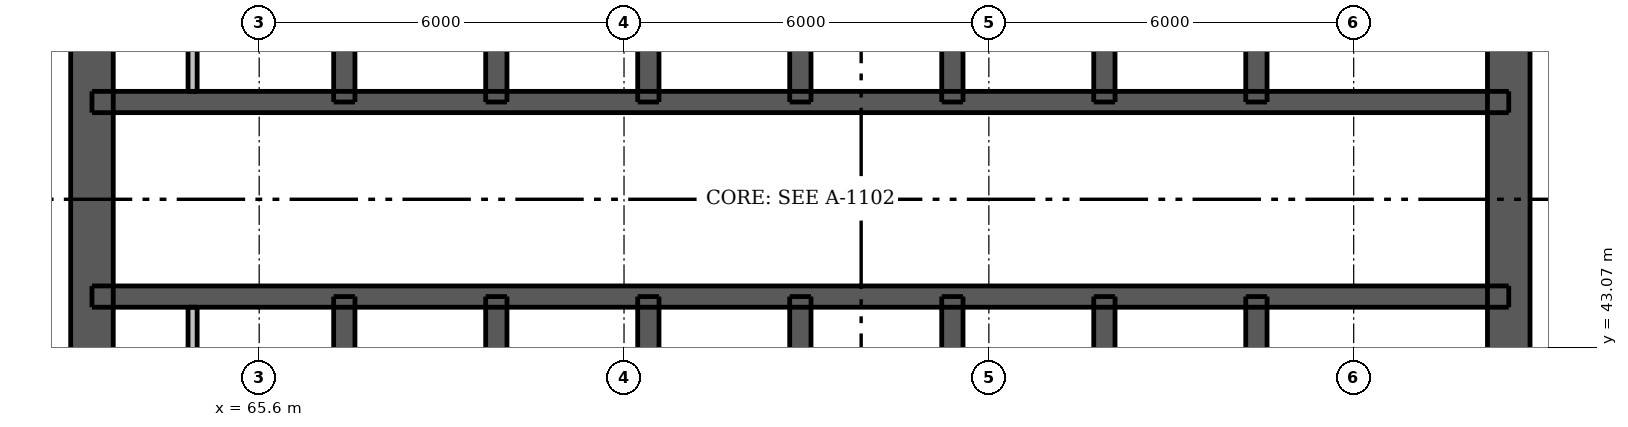
"""IFC4 building model, lengths in metres.
Left out: names, types, materials, properties, quantities, classifications, styles, units other than length and angle.
Written with IfcOpenShell. Run it as: python <this file> out.ifc"""

import sys

from ifc_helpers import new_model, si_unit, direction, frame, frame_2d, origin, place, context, subcontext, project, spatial, rectangle, extrude, element, fill, save


model = new_model("IFC4")
c1 = context("Model", 3, precision=1e-05, world=origin(), true_north=direction((0.0, 1.0)))
c2 = subcontext(c1, "Body", "Model", "MODEL_VIEW")
j1 = project(units=[si_unit("LENGTHUNIT", "METRE"), si_unit("PLANEANGLEUNIT", "RADIAN")], contexts=[c1])
p1 = place(None, origin())
s1 = spatial("IfcSite", under=j1, at=p1, CompositionType="ELEMENT")
p2 = place(p1, origin())
s2 = spatial("IfcBuilding", under=s1, at=p2, CompositionType="ELEMENT")
p3 = place(p2, frame((0.0, 0.0, 150.4)))
s3 = spatial("IfcBuildingStorey", under=s2, at=p3, CompositionType="ELEMENT", Elevation=150.4)
p4 = place(p3, frame((62.85, 33.5, 0.0), z_axis=(0.0, 0.0, 1.0), x_axis=(0.0, 1.0, 0.0)))
e1 = element("IfcWall", 1, at=p4, inside=s3, PredefinedType="SHEAR", context=c2, shape_type="SweptSolid", body=[
    extrude(rectangle(XDim=24.0, YDim=0.7, at=frame_2d((12.0, 0.0))), origin(), (0.0, 0.0, 1.0), 4.25),
])
p5 = place(p4, frame((11.2, 0.0, 0.0)))
e2 = element("IfcOpeningElement", 2, at=p5, cuts=e1, PredefinedType="OPENING", context=c2, shape_type="SweptSolid", body=[
    extrude(rectangle(XDim=1.6, YDim=2.1, at=frame_2d((0.8, 1.05))), frame((0.0, 0.36, 0.0), z_axis=(0.0, -1.0, 0.0), x_axis=(1.0, 0.0, 0.0)), (0.0, 0.0, 1.0), 0.72),
])
p6 = place(p3, frame((86.15, 33.5, 0.0), z_axis=(0.0, 0.0, 1.0), x_axis=(0.0, 1.0, 0.0)))
e3 = element("IfcWall", 3, at=p6, inside=s3, PredefinedType="SHEAR", context=c2, shape_type="SweptSolid", body=[
    extrude(rectangle(XDim=24.0, YDim=0.7, at=frame_2d((12.0, 0.0))), origin(), (0.0, 0.0, 1.0), 4.25),
])
p7 = place(p6, frame((11.2, 0.0, 0.0)))
e4 = element("IfcOpeningElement", 4, at=p7, cuts=e3, PredefinedType="OPENING", context=c2, shape_type="SweptSolid", body=[
    extrude(rectangle(XDim=1.6, YDim=2.1, at=frame_2d((0.8, 1.05))), frame((0.0, 0.36, 0.0), z_axis=(0.0, -1.0, 0.0), x_axis=(1.0, 0.0, 0.0)), (0.0, 0.0, 1.0), 0.72),
])
p8 = place(p3, frame((62.85, 43.9, 0.0), z_axis=(0.0, 0.0, 1.0), x_axis=(1.0, 0.0, 0.0)))
e5 = element("IfcWall", 5, at=p8, inside=s3, PredefinedType="SHEAR", context=c2, shape_type="SweptSolid", body=[
    extrude(rectangle(XDim=23.3, YDim=0.35, at=frame_2d((11.65, 0.0))), origin(), (0.0, 0.0, 1.0), 4.25),
])
p9 = place(p8, frame((0.603, 0.0, 0.0)))
e6 = element("IfcOpeningElement", 6, at=p9, cuts=e5, PredefinedType="OPENING", context=c2, shape_type="SweptSolid", body=[
    extrude(rectangle(XDim=0.8, YDim=2.1, at=frame_2d((0.4, 1.05))), frame((0.0, 0.185, 0.0), z_axis=(0.0, -1.0, 0.0), x_axis=(1.0, 0.0, 0.0)), (0.0, 0.0, 1.0), 0.37),
])
p10 = place(p8, frame((2.365, 0.0, 0.0)))
e7 = element("IfcOpeningElement", 7, at=p10, cuts=e5, PredefinedType="OPENING", context=c2, shape_type="SweptSolid", body=[
    extrude(rectangle(XDim=0.9, YDim=2.1, at=frame_2d((0.45, 1.05))), frame((0.0, 0.185, 0.0), z_axis=(0.0, -1.0, 0.0), x_axis=(1.0, 0.0, 0.0)), (0.0, 0.0, 1.0), 0.37),
])
p11 = place(p8, frame((20.688, 0.0, 0.0)))
e8 = element("IfcOpeningElement", 8, at=p11, cuts=e5, PredefinedType="OPENING", context=c2, shape_type="SweptSolid", body=[
    extrude(rectangle(XDim=0.9, YDim=2.1, at=frame_2d((0.45, 1.05))), frame((0.0, 0.185, 0.0), z_axis=(0.0, -1.0, 0.0), x_axis=(1.0, 0.0, 0.0)), (0.0, 0.0, 1.0), 0.37),
])
p12 = place(p8, frame((4.85, 0.0, 0.0)))
e9 = element("IfcOpeningElement", 9, at=p12, cuts=e5, PredefinedType="OPENING", context=c2, shape_type="SweptSolid", body=[
    extrude(rectangle(XDim=1.1, YDim=2.1, at=frame_2d((0.55, 1.05))), frame((0.0, 0.185, 0.0), z_axis=(0.0, -1.0, 0.0), x_axis=(1.0, 0.0, 0.0)), (0.0, 0.0, 1.0), 0.37),
])
p13 = place(p8, frame((7.35, 0.0, 0.0)))
e10 = element("IfcOpeningElement", 10, at=p13, cuts=e5, PredefinedType="OPENING", context=c2, shape_type="SweptSolid", body=[
    extrude(rectangle(XDim=1.1, YDim=2.1, at=frame_2d((0.55, 1.05))), frame((0.0, 0.185, 0.0), z_axis=(0.0, -1.0, 0.0), x_axis=(1.0, 0.0, 0.0)), (0.0, 0.0, 1.0), 0.37),
])
p14 = place(p8, frame((9.85, 0.0, 0.0)))
e11 = element("IfcOpeningElement", 11, at=p14, cuts=e5, PredefinedType="OPENING", context=c2, shape_type="SweptSolid", body=[
    extrude(rectangle(XDim=1.1, YDim=2.1, at=frame_2d((0.55, 1.05))), frame((0.0, 0.185, 0.0), z_axis=(0.0, -1.0, 0.0), x_axis=(1.0, 0.0, 0.0)), (0.0, 0.0, 1.0), 0.37),
])
p15 = place(p8, frame((12.35, 0.0, 0.0)))
e12 = element("IfcOpeningElement", 12, at=p15, cuts=e5, PredefinedType="OPENING", context=c2, shape_type="SweptSolid", body=[
    extrude(rectangle(XDim=1.1, YDim=2.1, at=frame_2d((0.55, 1.05))), frame((0.0, 0.185, 0.0), z_axis=(0.0, -1.0, 0.0), x_axis=(1.0, 0.0, 0.0)), (0.0, 0.0, 1.0), 0.37),
])
p16 = place(p8, frame((14.85, 0.0, 0.0)))
e13 = element("IfcOpeningElement", 13, at=p16, cuts=e5, PredefinedType="OPENING", context=c2, shape_type="SweptSolid", body=[
    extrude(rectangle(XDim=1.1, YDim=2.1, at=frame_2d((0.55, 1.05))), frame((0.0, 0.185, 0.0), z_axis=(0.0, -1.0, 0.0), x_axis=(1.0, 0.0, 0.0)), (0.0, 0.0, 1.0), 0.37),
])
p17 = place(p8, frame((17.35, 0.0, 0.0)))
e14 = element("IfcOpeningElement", 14, at=p17, cuts=e5, PredefinedType="OPENING", context=c2, shape_type="SweptSolid", body=[
    extrude(rectangle(XDim=1.1, YDim=2.1, at=frame_2d((0.55, 1.05))), frame((0.0, 0.185, 0.0), z_axis=(0.0, -1.0, 0.0), x_axis=(1.0, 0.0, 0.0)), (0.0, 0.0, 1.0), 0.37),
])
p18 = place(p3, frame((62.85, 47.1, 0.0), z_axis=(0.0, 0.0, 1.0), x_axis=(1.0, 0.0, 0.0)))
e15 = element("IfcWall", 15, at=p18, inside=s3, PredefinedType="SHEAR", context=c2, shape_type="SweptSolid", body=[
    extrude(rectangle(XDim=23.3, YDim=0.35, at=frame_2d((11.65, 0.0))), origin(), (0.0, 0.0, 1.0), 4.25),
])
p19 = place(p18, frame((0.603, 0.0, 0.0)))
e16 = element("IfcOpeningElement", 16, at=p19, cuts=e15, PredefinedType="OPENING", context=c2, shape_type="SweptSolid", body=[
    extrude(rectangle(XDim=0.8, YDim=2.1, at=frame_2d((0.4, 1.05))), frame((0.0, 0.185, 0.0), z_axis=(0.0, -1.0, 0.0), x_axis=(1.0, 0.0, 0.0)), (0.0, 0.0, 1.0), 0.37),
])
p20 = place(p18, frame((2.365, 0.0, 0.0)))
e17 = element("IfcOpeningElement", 17, at=p20, cuts=e15, PredefinedType="OPENING", context=c2, shape_type="SweptSolid", body=[
    extrude(rectangle(XDim=0.9, YDim=2.1, at=frame_2d((0.45, 1.05))), frame((0.0, 0.185, 0.0), z_axis=(0.0, -1.0, 0.0), x_axis=(1.0, 0.0, 0.0)), (0.0, 0.0, 1.0), 0.37),
])
p21 = place(p18, frame((20.688, 0.0, 0.0)))
e18 = element("IfcOpeningElement", 18, at=p21, cuts=e15, PredefinedType="OPENING", context=c2, shape_type="SweptSolid", body=[
    extrude(rectangle(XDim=0.9, YDim=2.1, at=frame_2d((0.45, 1.05))), frame((0.0, 0.185, 0.0), z_axis=(0.0, -1.0, 0.0), x_axis=(1.0, 0.0, 0.0)), (0.0, 0.0, 1.0), 0.37),
])
p22 = place(p18, frame((4.85, 0.0, 0.0)))
e19 = element("IfcOpeningElement", 19, at=p22, cuts=e15, PredefinedType="OPENING", context=c2, shape_type="SweptSolid", body=[
    extrude(rectangle(XDim=1.1, YDim=2.1, at=frame_2d((0.55, 1.05))), frame((0.0, 0.185, 0.0), z_axis=(0.0, -1.0, 0.0), x_axis=(1.0, 0.0, 0.0)), (0.0, 0.0, 1.0), 0.37),
])
p23 = place(p18, frame((7.35, 0.0, 0.0)))
e20 = element("IfcOpeningElement", 20, at=p23, cuts=e15, PredefinedType="OPENING", context=c2, shape_type="SweptSolid", body=[
    extrude(rectangle(XDim=1.1, YDim=2.1, at=frame_2d((0.55, 1.05))), frame((0.0, 0.185, 0.0), z_axis=(0.0, -1.0, 0.0), x_axis=(1.0, 0.0, 0.0)), (0.0, 0.0, 1.0), 0.37),
])
p24 = place(p18, frame((9.85, 0.0, 0.0)))
e21 = element("IfcOpeningElement", 21, at=p24, cuts=e15, PredefinedType="OPENING", context=c2, shape_type="SweptSolid", body=[
    extrude(rectangle(XDim=1.1, YDim=2.1, at=frame_2d((0.55, 1.05))), frame((0.0, 0.185, 0.0), z_axis=(0.0, -1.0, 0.0), x_axis=(1.0, 0.0, 0.0)), (0.0, 0.0, 1.0), 0.37),
])
p25 = place(p18, frame((12.35, 0.0, 0.0)))
e22 = element("IfcOpeningElement", 22, at=p25, cuts=e15, PredefinedType="OPENING", context=c2, shape_type="SweptSolid", body=[
    extrude(rectangle(XDim=1.1, YDim=2.1, at=frame_2d((0.55, 1.05))), frame((0.0, 0.185, 0.0), z_axis=(0.0, -1.0, 0.0), x_axis=(1.0, 0.0, 0.0)), (0.0, 0.0, 1.0), 0.37),
])
p26 = place(p18, frame((14.85, 0.0, 0.0)))
e23 = element("IfcOpeningElement", 23, at=p26, cuts=e15, PredefinedType="OPENING", context=c2, shape_type="SweptSolid", body=[
    extrude(rectangle(XDim=1.1, YDim=2.1, at=frame_2d((0.55, 1.05))), frame((0.0, 0.185, 0.0), z_axis=(0.0, -1.0, 0.0), x_axis=(1.0, 0.0, 0.0)), (0.0, 0.0, 1.0), 0.37),
])
p27 = place(p18, frame((17.35, 0.0, 0.0)))
e24 = element("IfcOpeningElement", 24, at=p27, cuts=e15, PredefinedType="OPENING", context=c2, shape_type="SweptSolid", body=[
    extrude(rectangle(XDim=1.1, YDim=2.1, at=frame_2d((0.55, 1.05))), frame((0.0, 0.185, 0.0), z_axis=(0.0, -1.0, 0.0), x_axis=(1.0, 0.0, 0.0)), (0.0, 0.0, 1.0), 0.37),
])
p28 = place(p3, frame((67.0, 33.85, 0.0), z_axis=(0.0, 0.0, 1.0), x_axis=(0.0, 1.0, 0.0)))
e25 = element("IfcWall", 25, at=p28, inside=s3, PredefinedType="SHEAR", context=c2, shape_type="SweptSolid", body=[
    extrude(rectangle(XDim=10.05, YDim=0.35, at=frame_2d((5.025, 0.0))), origin(), (0.0, 0.0, 1.0), 4.25),
])
p29 = place(p28, frame((0.55, 0.0, 0.0)))
e26 = element("IfcOpeningElement", 26, at=p29, cuts=e25, PredefinedType="OPENING", context=c2, shape_type="SweptSolid", body=[
    extrude(rectangle(XDim=1.1, YDim=2.1, at=frame_2d((0.55, 1.05))), frame((0.0, 0.185, 0.0), z_axis=(0.0, -1.0, 0.0), x_axis=(1.0, 0.0, 0.0)), (0.0, 0.0, 1.0), 0.37),
])
for number, where, z_axis, x_axis in (
    (27, (67.0, 47.1, 0.0), (0.0, 0.0, 1.0), (0.0, 1.0, 0.0)),
    (28, (82.0, 33.85, 0.0), (0.0, 0.0, 1.0), (0.0, 1.0, 0.0)),
    (29, (82.0, 47.1, 0.0), (0.0, 0.0, 1.0), (0.0, 1.0, 0.0)),
):
    element("IfcWall", number, at=place(p3, frame(where, z_axis=z_axis, x_axis=x_axis)), inside=s3, PredefinedType="SHEAR", context=c2, shape_type="SweptSolid", body=[
        extrude(rectangle(XDim=10.05, YDim=0.35, at=frame_2d((5.025, 0.0))), origin(), (0.0, 0.0, 1.0), 4.25),
    ])
for number, where, z_axis, x_axis in (
    (30, (69.5, 41.0, 0.0), (0.0, 0.0, 1.0), (0.0, 1.0, 0.0)),
    (31, (69.5, 47.1, 0.0), (0.0, 0.0, 1.0), (0.0, 1.0, 0.0)),
    (32, (72.0, 41.0, 0.0), (0.0, 0.0, 1.0), (0.0, 1.0, 0.0)),
    (33, (72.0, 47.1, 0.0), (0.0, 0.0, 1.0), (0.0, 1.0, 0.0)),
    (34, (74.5, 41.0, 0.0), (0.0, 0.0, 1.0), (0.0, 1.0, 0.0)),
    (35, (74.5, 47.1, 0.0), (0.0, 0.0, 1.0), (0.0, 1.0, 0.0)),
    (36, (77.0, 41.0, 0.0), (0.0, 0.0, 1.0), (0.0, 1.0, 0.0)),
    (37, (77.0, 47.1, 0.0), (0.0, 0.0, 1.0), (0.0, 1.0, 0.0)),
    (38, (79.5, 41.0, 0.0), (0.0, 0.0, 1.0), (0.0, 1.0, 0.0)),
    (39, (79.5, 47.1, 0.0), (0.0, 0.0, 1.0), (0.0, 1.0, 0.0)),
):
    element("IfcWall", number, at=place(p3, frame(where, z_axis=z_axis, x_axis=x_axis)), inside=s3, PredefinedType="SHEAR", context=c2, shape_type="SweptSolid", body=[
        extrude(rectangle(XDim=2.9, YDim=0.35, at=frame_2d((1.45, 0.0))), origin(), (0.0, 0.0, 1.0), 4.25),
    ])
for number, where, z_axis, x_axis in (
    (40, (64.505, 41.175, 0.0), (0.0, 0.0, 1.0), (0.0, 1.0, 0.0)),
    (41, (64.505, 47.275, 0.0), (0.0, 0.0, 1.0), (0.0, 1.0, 0.0)),
):
    element("IfcWall", number, at=place(p3, frame(where, z_axis=z_axis, x_axis=x_axis)), inside=s3, PredefinedType="PLUMBINGWALL", context=c2, shape_type="SweptSolid", body=[
        extrude(rectangle(XDim=2.55, YDim=0.15, at=frame_2d((1.275, 0.0))), origin(), (0.0, 0.0, 1.0), 4.25),
    ])
p30 = place(p5, origin())
e42 = element("IfcDoor", 42, at=p30, inside=s3, OperationType="DOUBLE_DOOR_SINGLE_SWING", PredefinedType="DOOR", context=c2, shape_type="SweptSolid", body=[
    extrude(rectangle(XDim=1.6, YDim=2.1, at=frame_2d((0.8, 1.05))), frame((0.0, -0.288, 0.0), z_axis=(0.0, -1.0, 0.0), x_axis=(1.0, 0.0, 0.0)), (0.0, 0.0, 1.0), 0.05),
])
fill(e2, e42)
p31 = place(p7, origin())
e43 = element("IfcDoor", 43, at=p31, inside=s3, OperationType="DOUBLE_DOOR_SINGLE_SWING", PredefinedType="DOOR", context=c2, shape_type="SweptSolid", body=[
    extrude(rectangle(XDim=1.6, YDim=2.1, at=frame_2d((0.8, 1.05))), frame((0.0, 0.337, 0.0), z_axis=(0.0, -1.0, 0.0), x_axis=(1.0, 0.0, 0.0)), (0.0, 0.0, 1.0), 0.05),
])
fill(e4, e43)
p32 = place(p9, origin())
e44 = element("IfcDoor", 44, at=p32, inside=s3, OperationType="SINGLE_SWING_LEFT", PredefinedType="DOOR", context=c2, shape_type="SweptSolid", body=[
    extrude(rectangle(XDim=0.8, YDim=2.1, at=frame_2d((0.4, 1.05))), frame((0.0, -0.112, 0.0), z_axis=(0.0, -1.0, 0.0), x_axis=(1.0, 0.0, 0.0)), (0.0, 0.0, 1.0), 0.05),
])
fill(e6, e44)
p33 = place(p10, origin())
e45 = element("IfcDoor", 45, at=p33, inside=s3, OperationType="SINGLE_SWING_RIGHT", PredefinedType="DOOR", context=c2, shape_type="SweptSolid", body=[
    extrude(rectangle(XDim=0.9, YDim=2.1, at=frame_2d((0.45, 1.05))), frame((0.0, -0.112, 0.0), z_axis=(0.0, -1.0, 0.0), x_axis=(1.0, 0.0, 0.0)), (0.0, 0.0, 1.0), 0.05),
])
fill(e7, e45)
p34 = place(p11, origin())
e46 = element("IfcDoor", 46, at=p34, inside=s3, OperationType="SINGLE_SWING_LEFT", PredefinedType="DOOR", context=c2, shape_type="SweptSolid", body=[
    extrude(rectangle(XDim=0.9, YDim=2.1, at=frame_2d((0.45, 1.05))), frame((0.0, -0.112, 0.0), z_axis=(0.0, -1.0, 0.0), x_axis=(1.0, 0.0, 0.0)), (0.0, 0.0, 1.0), 0.05),
])
fill(e8, e46)
p35 = place(p19, origin())
e47 = element("IfcDoor", 47, at=p35, inside=s3, OperationType="SINGLE_SWING_LEFT", PredefinedType="DOOR", context=c2, shape_type="SweptSolid", body=[
    extrude(rectangle(XDim=0.8, YDim=2.1, at=frame_2d((0.4, 1.05))), frame((0.0, 0.163, 0.0), z_axis=(0.0, -1.0, 0.0), x_axis=(1.0, 0.0, 0.0)), (0.0, 0.0, 1.0), 0.05),
])
fill(e16, e47)
p36 = place(p20, origin())
e48 = element("IfcDoor", 48, at=p36, inside=s3, OperationType="SINGLE_SWING_RIGHT", PredefinedType="DOOR", context=c2, shape_type="SweptSolid", body=[
    extrude(rectangle(XDim=0.9, YDim=2.1, at=frame_2d((0.45, 1.05))), frame((0.0, 0.163, 0.0), z_axis=(0.0, -1.0, 0.0), x_axis=(1.0, 0.0, 0.0)), (0.0, 0.0, 1.0), 0.05),
])
fill(e17, e48)
p37 = place(p21, origin())
e49 = element("IfcDoor", 49, at=p37, inside=s3, OperationType="SINGLE_SWING_LEFT", PredefinedType="DOOR", context=c2, shape_type="SweptSolid", body=[
    extrude(rectangle(XDim=0.9, YDim=2.1, at=frame_2d((0.45, 1.05))), frame((0.0, 0.163, 0.0), z_axis=(0.0, -1.0, 0.0), x_axis=(1.0, 0.0, 0.0)), (0.0, 0.0, 1.0), 0.05),
])
fill(e18, e49)
p38 = place(p12, origin())
e50 = element("IfcDoor", 50, at=p38, inside=s3, OperationType="DOUBLE_DOOR_SLIDING", PredefinedType="DOOR", context=c2, shape_type="SweptSolid", body=[
    extrude(rectangle(XDim=1.1, YDim=2.1, at=frame_2d((0.55, 1.05))), frame((0.0, 0.025, 0.0), z_axis=(0.0, -1.0, 0.0), x_axis=(1.0, 0.0, 0.0)), (0.0, 0.0, 1.0), 0.05),
])
fill(e9, e50)
p39 = place(p22, origin())
e51 = element("IfcDoor", 51, at=p39, inside=s3, OperationType="DOUBLE_DOOR_SLIDING", PredefinedType="DOOR", context=c2, shape_type="SweptSolid", body=[
    extrude(rectangle(XDim=1.1, YDim=2.1, at=frame_2d((0.55, 1.05))), frame((0.0, 0.025, 0.0), z_axis=(0.0, -1.0, 0.0), x_axis=(1.0, 0.0, 0.0)), (0.0, 0.0, 1.0), 0.05),
])
fill(e19, e51)
p40 = place(p13, origin())
e52 = element("IfcDoor", 52, at=p40, inside=s3, OperationType="DOUBLE_DOOR_SLIDING", PredefinedType="DOOR", context=c2, shape_type="SweptSolid", body=[
    extrude(rectangle(XDim=1.1, YDim=2.1, at=frame_2d((0.55, 1.05))), frame((0.0, 0.025, 0.0), z_axis=(0.0, -1.0, 0.0), x_axis=(1.0, 0.0, 0.0)), (0.0, 0.0, 1.0), 0.05),
])
fill(e10, e52)
p41 = place(p23, origin())
e53 = element("IfcDoor", 53, at=p41, inside=s3, OperationType="DOUBLE_DOOR_SLIDING", PredefinedType="DOOR", context=c2, shape_type="SweptSolid", body=[
    extrude(rectangle(XDim=1.1, YDim=2.1, at=frame_2d((0.55, 1.05))), frame((0.0, 0.025, 0.0), z_axis=(0.0, -1.0, 0.0), x_axis=(1.0, 0.0, 0.0)), (0.0, 0.0, 1.0), 0.05),
])
fill(e20, e53)
p42 = place(p14, origin())
e54 = element("IfcDoor", 54, at=p42, inside=s3, OperationType="DOUBLE_DOOR_SLIDING", PredefinedType="DOOR", context=c2, shape_type="SweptSolid", body=[
    extrude(rectangle(XDim=1.1, YDim=2.1, at=frame_2d((0.55, 1.05))), frame((0.0, 0.025, 0.0), z_axis=(0.0, -1.0, 0.0), x_axis=(1.0, 0.0, 0.0)), (0.0, 0.0, 1.0), 0.05),
])
fill(e11, e54)
p43 = place(p24, origin())
e55 = element("IfcDoor", 55, at=p43, inside=s3, OperationType="DOUBLE_DOOR_SLIDING", PredefinedType="DOOR", context=c2, shape_type="SweptSolid", body=[
    extrude(rectangle(XDim=1.1, YDim=2.1, at=frame_2d((0.55, 1.05))), frame((0.0, 0.025, 0.0), z_axis=(0.0, -1.0, 0.0), x_axis=(1.0, 0.0, 0.0)), (0.0, 0.0, 1.0), 0.05),
])
fill(e21, e55)
p44 = place(p15, origin())
e56 = element("IfcDoor", 56, at=p44, inside=s3, OperationType="DOUBLE_DOOR_SLIDING", PredefinedType="DOOR", context=c2, shape_type="SweptSolid", body=[
    extrude(rectangle(XDim=1.1, YDim=2.1, at=frame_2d((0.55, 1.05))), frame((0.0, 0.025, 0.0), z_axis=(0.0, -1.0, 0.0), x_axis=(1.0, 0.0, 0.0)), (0.0, 0.0, 1.0), 0.05),
])
fill(e12, e56)
p45 = place(p25, origin())
e57 = element("IfcDoor", 57, at=p45, inside=s3, OperationType="DOUBLE_DOOR_SLIDING", PredefinedType="DOOR", context=c2, shape_type="SweptSolid", body=[
    extrude(rectangle(XDim=1.1, YDim=2.1, at=frame_2d((0.55, 1.05))), frame((0.0, 0.025, 0.0), z_axis=(0.0, -1.0, 0.0), x_axis=(1.0, 0.0, 0.0)), (0.0, 0.0, 1.0), 0.05),
])
fill(e22, e57)
p46 = place(p16, origin())
e58 = element("IfcDoor", 58, at=p46, inside=s3, OperationType="DOUBLE_DOOR_SLIDING", PredefinedType="DOOR", context=c2, shape_type="SweptSolid", body=[
    extrude(rectangle(XDim=1.1, YDim=2.1, at=frame_2d((0.55, 1.05))), frame((0.0, 0.025, 0.0), z_axis=(0.0, -1.0, 0.0), x_axis=(1.0, 0.0, 0.0)), (0.0, 0.0, 1.0), 0.05),
])
fill(e13, e58)
p47 = place(p26, origin())
e59 = element("IfcDoor", 59, at=p47, inside=s3, OperationType="DOUBLE_DOOR_SLIDING", PredefinedType="DOOR", context=c2, shape_type="SweptSolid", body=[
    extrude(rectangle(XDim=1.1, YDim=2.1, at=frame_2d((0.55, 1.05))), frame((0.0, 0.025, 0.0), z_axis=(0.0, -1.0, 0.0), x_axis=(1.0, 0.0, 0.0)), (0.0, 0.0, 1.0), 0.05),
])
fill(e23, e59)
p48 = place(p17, origin())
e60 = element("IfcDoor", 60, at=p48, inside=s3, OperationType="DOUBLE_DOOR_SLIDING", PredefinedType="DOOR", context=c2, shape_type="SweptSolid", body=[
    extrude(rectangle(XDim=1.1, YDim=2.1, at=frame_2d((0.55, 1.05))), frame((0.0, 0.025, 0.0), z_axis=(0.0, -1.0, 0.0), x_axis=(1.0, 0.0, 0.0)), (0.0, 0.0, 1.0), 0.05),
])
fill(e14, e60)
p49 = place(p27, origin())
e61 = element("IfcDoor", 61, at=p49, inside=s3, OperationType="DOUBLE_DOOR_SLIDING", PredefinedType="DOOR", context=c2, shape_type="SweptSolid", body=[
    extrude(rectangle(XDim=1.1, YDim=2.1, at=frame_2d((0.55, 1.05))), frame((0.0, 0.025, 0.0), z_axis=(0.0, -1.0, 0.0), x_axis=(1.0, 0.0, 0.0)), (0.0, 0.0, 1.0), 0.05),
])
fill(e24, e61)
save(model, sys.argv[1])
